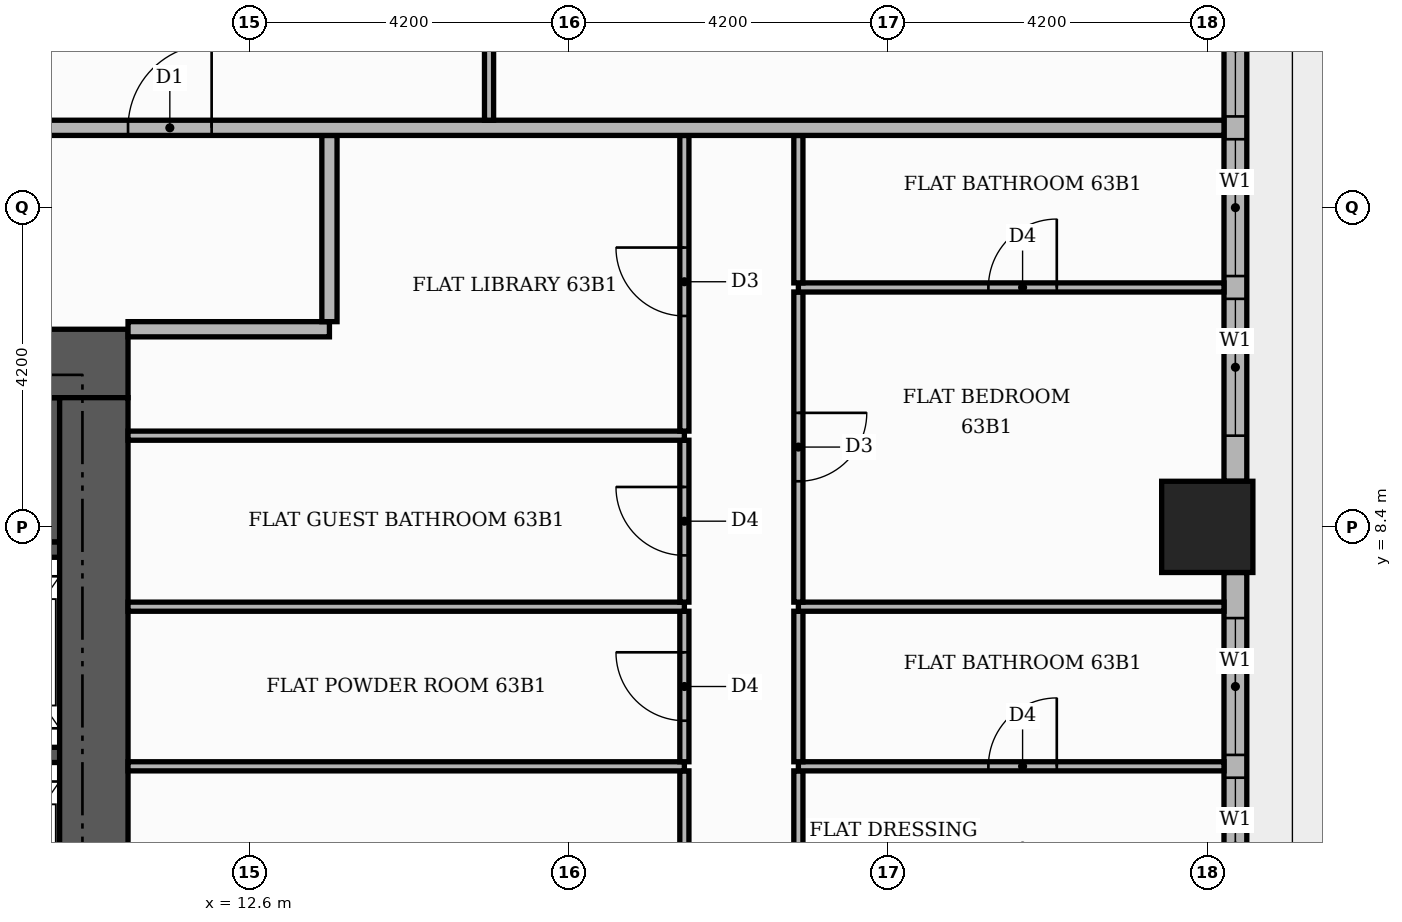
"""IFC4 building model, lengths in metres.
Left out: names, types, materials, properties, quantities, classifications, styles, units other than length and angle.
Written with IfcOpenShell. Run it as: python <this file> out.ifc"""

import sys

from ifc_helpers import new_model, si_unit, direction, frame, frame_2d, origin, origin_2d, place, context, subcontext, project, spatial, rectangle, extrude, element, fill, save


model = new_model("IFC4")
c1 = context("Model", 3, precision=1e-05, world=origin(), true_north=direction((0.0, 1.0)))
c2 = subcontext(c1, "Body", "Model", "MODEL_VIEW")
j1 = project(units=[si_unit("LENGTHUNIT", "METRE"), si_unit("PLANEANGLEUNIT", "RADIAN")], contexts=[c1])
p1 = place(None, origin())
s1 = spatial("IfcSite", under=j1, at=p1, CompositionType="ELEMENT")
p2 = place(p1, origin())
s2 = spatial("IfcBuilding", under=s1, at=p2, CompositionType="ELEMENT")
p3 = place(p2, frame((0.0, 0.0, 264.0)))
s3 = spatial("IfcBuildingStorey", under=s2, at=p3, CompositionType="ELEMENT", Elevation=264.0)
p4 = place(p3, frame((5.5, 9.15, 0.0), z_axis=(0.0, 0.0, 1.0), x_axis=(1.0, 0.0, 0.0)))
e1 = element("IfcWall", 1, at=p4, inside=s3, PredefinedType="SHEAR", context=c2, shape_type="SweptSolid", body=[
    extrude(rectangle(XDim=4.6, YDim=1.9, at=frame_2d((2.3, 0.0))), origin(), (0.0, 0.0, 1.0), 3.48),
])
for number, where, z_axis, x_axis in (
    (2, (8.1, 5.4, 0.0), (0.0, 0.0, 1.0), (1.0, 0.0, 0.0)),
    (3, (8.1, 8.1, 0.0), (0.0, 0.0, 1.0), (1.0, 0.0, 0.0)),
):
    element("IfcWall", number, at=place(p3, frame(where, z_axis=z_axis, x_axis=x_axis)), inside=s3, PredefinedType="SHEAR", context=c2, shape_type="SweptSolid", body=[
        extrude(rectangle(XDim=2.0, YDim=0.2, at=frame_2d((1.0, 0.0))), origin(), (0.0, 0.0, 1.0), 3.48),
    ])
p5 = place(p3, frame((-11.0, 10.55, 0.0), z_axis=(0.0, 0.0, 1.0), x_axis=(1.0, 0.0, 0.0)))
e4 = element("IfcWall", 4, at=p5, inside=s3, PredefinedType="SHEAR", context=c2, shape_type="SweptSolid", body=[
    extrude(rectangle(XDim=22.0, YDim=0.9, at=frame_2d((11.0, 0.0))), origin(), (0.0, 0.0, 1.0), 3.48),
])
p6 = place(p5, frame((13.3, 0.0, 0.0)))
e5 = element("IfcOpeningElement", 5, at=p6, cuts=e4, PredefinedType="OPENING", context=c2, shape_type="SweptSolid", body=[
    extrude(rectangle(XDim=1.8, YDim=2.2, at=frame_2d((0.9, 1.1))), frame((0.0, 0.46, 0.0), z_axis=(0.0, -1.0, 0.0), x_axis=(1.0, 0.0, 0.0)), (0.0, 0.0, 1.0), 0.92),
])
p7 = place(p3, frame((10.55, -10.1, 0.0), z_axis=(0.0, 0.0, 1.0), x_axis=(0.0, 1.0, 0.0)))
e6 = element("IfcWall", 6, at=p7, inside=s3, PredefinedType="SHEAR", context=c2, shape_type="SweptSolid", body=[
    extrude(rectangle(XDim=20.2, YDim=0.9, at=frame_2d((10.1, 0.0))), origin(), (0.0, 0.0, 1.0), 3.48),
])
p8 = place(p3, frame((25.2, 8.4, 0.0), z_axis=(0.0, 0.0, 1.0), x_axis=(1.0, 0.0, 0.0)))
e7 = element("IfcColumn", 7, at=p8, inside=s3, PredefinedType="COLUMN", context=c2, shape_type="SweptSolid", body=[
    extrude(rectangle(XDim=1.2, YDim=1.2, at=origin_2d()), origin(), (0.0, 0.0, 1.0), 3.9),
])
p9 = place(p3, frame((25.57, 0.6, 0.0), z_axis=(0.0, 0.0, 1.0), x_axis=(0.0, 1.0, 0.0)))
e8 = element("IfcWall", 8, at=p9, inside=s3, PredefinedType="STANDARD", context=c2, shape_type="SweptSolid", body=[
    extrude(rectangle(XDim=7.2, YDim=0.3, at=frame_2d((3.6, 0.0))), origin(), (0.0, 0.0, 1.0), 3.48),
])
p10 = place(p9, frame((0.6, 0.0, 0.0)))
e9 = element("IfcOpeningElement", 9, at=p10, cuts=e8, PredefinedType="OPENING", context=c2, shape_type="SweptSolid", body=[
    extrude(rectangle(XDim=1.8, YDim=2.4, at=frame_2d((0.9, 1.2))), frame((0.0, 0.16, 0.0), z_axis=(0.0, -1.0, 0.0), x_axis=(1.0, 0.0, 0.0)), (0.0, 0.0, 1.0), 0.32),
])
p11 = place(p9, frame((2.7, 0.0, 0.9)))
e10 = element("IfcOpeningElement", 10, at=p11, cuts=e8, PredefinedType="OPENING", context=c2, shape_type="SweptSolid", body=[
    extrude(rectangle(XDim=1.8, YDim=2.1, at=frame_2d((0.9, 1.05))), frame((0.0, 0.16, 0.0), z_axis=(0.0, -1.0, 0.0), x_axis=(1.0, 0.0, 0.0)), (0.0, 0.0, 1.0), 0.32),
])
p12 = place(p9, frame((4.8, 0.0, 0.9)))
e11 = element("IfcOpeningElement", 11, at=p12, cuts=e8, PredefinedType="OPENING", context=c2, shape_type="SweptSolid", body=[
    extrude(rectangle(XDim=1.8, YDim=2.1, at=frame_2d((0.9, 1.05))), frame((0.0, 0.16, 0.0), z_axis=(0.0, -1.0, 0.0), x_axis=(1.0, 0.0, 0.0)), (0.0, 0.0, 1.0), 0.32),
])
p13 = place(p3, frame((25.57, 9.0, 0.0), z_axis=(0.0, 0.0, 1.0), x_axis=(0.0, 1.0, 0.0)))
e12 = element("IfcWall", 12, at=p13, inside=s3, PredefinedType="STANDARD", context=c2, shape_type="SweptSolid", body=[
    extrude(rectangle(XDim=7.2, YDim=0.3, at=frame_2d((3.6, 0.0))), origin(), (0.0, 0.0, 1.0), 3.48),
])
p14 = place(p13, frame((0.6, 0.0, 0.9)))
e13 = element("IfcOpeningElement", 13, at=p14, cuts=e12, PredefinedType="OPENING", context=c2, shape_type="SweptSolid", body=[
    extrude(rectangle(XDim=1.8, YDim=2.1, at=frame_2d((0.9, 1.05))), frame((0.0, 0.16, 0.0), z_axis=(0.0, -1.0, 0.0), x_axis=(1.0, 0.0, 0.0)), (0.0, 0.0, 1.0), 0.32),
])
p15 = place(p13, frame((2.7, 0.0, 0.9)))
e14 = element("IfcOpeningElement", 14, at=p15, cuts=e12, PredefinedType="OPENING", context=c2, shape_type="SweptSolid", body=[
    extrude(rectangle(XDim=1.8, YDim=2.1, at=frame_2d((0.9, 1.05))), frame((0.0, 0.16, 0.0), z_axis=(0.0, -1.0, 0.0), x_axis=(1.0, 0.0, 0.0)), (0.0, 0.0, 1.0), 0.32),
])
p16 = place(p13, frame((4.8, 0.0, 0.9)))
e15 = element("IfcOpeningElement", 15, at=p16, cuts=e12, PredefinedType="OPENING", context=c2, shape_type="SweptSolid", body=[
    extrude(rectangle(XDim=1.8, YDim=2.1, at=frame_2d((0.9, 1.05))), frame((0.0, 0.16, 0.0), z_axis=(0.0, -1.0, 0.0), x_axis=(1.0, 0.0, 0.0)), (0.0, 0.0, 1.0), 0.32),
])
p17 = place(p3, frame((18.32, 1.11, 0.0), z_axis=(0.0, 0.0, 1.0), x_axis=(0.0, 1.0, 0.0)))
e16 = element("IfcWall", 16, at=p17, inside=s3, PredefinedType="PARTITIONING", context=c2, shape_type="SweptSolid", body=[
    extrude(rectangle(XDim=4.08, YDim=0.12, at=frame_2d((2.04, 0.0))), origin(), (0.0, 0.0, 1.0), 3.48),
])
p18 = place(p17, frame((1.59, 0.0, 0.0)))
e17 = element("IfcOpeningElement", 17, at=p18, cuts=e16, PredefinedType="OPENING", context=c2, shape_type="SweptSolid", body=[
    extrude(rectangle(XDim=0.9, YDim=2.1, at=frame_2d((0.45, 1.05))), frame((0.0, 0.07, 0.0), z_axis=(0.0, -1.0, 0.0), x_axis=(1.0, 0.0, 0.0)), (0.0, 0.0, 1.0), 0.14),
])
p19 = place(p3, frame((19.82, 3.21, 0.0), z_axis=(0.0, 0.0, 1.0), x_axis=(0.0, 1.0, 0.0)))
e18 = element("IfcWall", 18, at=p19, inside=s3, PredefinedType="PARTITIONING", context=c2, shape_type="SweptSolid", body=[
    extrude(rectangle(XDim=1.98, YDim=0.12, at=frame_2d((0.99, 0.0))), origin(), (0.0, 0.0, 1.0), 3.48),
])
p20 = place(p3, frame((11.0, 5.25, 0.0), z_axis=(0.0, 0.0, 1.0), x_axis=(1.0, 0.0, 0.0)))
e19 = element("IfcWall", 19, at=p20, inside=s3, PredefinedType="PARTITIONING", context=c2, shape_type="SweptSolid", body=[
    extrude(rectangle(XDim=7.32, YDim=0.12, at=frame_2d((3.66, 0.0))), origin(), (0.0, 0.0, 1.0), 3.48),
])
p21 = place(p3, frame((19.82, 5.25, 0.0), z_axis=(0.0, 0.0, 1.0), x_axis=(1.0, 0.0, 0.0)))
e20 = element("IfcWall", 20, at=p21, inside=s3, PredefinedType="PARTITIONING", context=c2, shape_type="SweptSolid", body=[
    extrude(rectangle(XDim=5.6, YDim=0.12, at=frame_2d((2.8, 0.0))), origin(), (0.0, 0.0, 1.0), 3.48),
])
p22 = place(p21, frame((2.5, 0.0, 0.0)))
e21 = element("IfcOpeningElement", 21, at=p22, cuts=e20, PredefinedType="OPENING", context=c2, shape_type="SweptSolid", body=[
    extrude(rectangle(XDim=0.9, YDim=2.1, at=frame_2d((0.45, 1.05))), frame((0.0, 0.07, 0.0), z_axis=(0.0, -1.0, 0.0), x_axis=(1.0, 0.0, 0.0)), (0.0, 0.0, 1.0), 0.14),
])
p23 = place(p3, frame((18.32, 5.31, 0.0), z_axis=(0.0, 0.0, 1.0), x_axis=(0.0, 1.0, 0.0)))
e22 = element("IfcWall", 22, at=p23, inside=s3, PredefinedType="PARTITIONING", context=c2, shape_type="SweptSolid", body=[
    extrude(rectangle(XDim=1.98, YDim=0.12, at=frame_2d((0.99, 0.0))), origin(), (0.0, 0.0, 1.0), 3.48),
])
p24 = place(p23, frame((0.54, 0.0, 0.0)))
e23 = element("IfcOpeningElement", 23, at=p24, cuts=e22, PredefinedType="OPENING", context=c2, shape_type="SweptSolid", body=[
    extrude(rectangle(XDim=0.9, YDim=2.1, at=frame_2d((0.45, 1.05))), frame((0.0, 0.07, 0.0), z_axis=(0.0, -1.0, 0.0), x_axis=(1.0, 0.0, 0.0)), (0.0, 0.0, 1.0), 0.14),
])
p25 = place(p3, frame((19.82, 5.31, 0.0), z_axis=(0.0, 0.0, 1.0), x_axis=(0.0, 1.0, 0.0)))
e24 = element("IfcWall", 24, at=p25, inside=s3, PredefinedType="PARTITIONING", context=c2, shape_type="SweptSolid", body=[
    extrude(rectangle(XDim=1.98, YDim=0.12, at=frame_2d((0.99, 0.0))), origin(), (0.0, 0.0, 1.0), 3.48),
])
p26 = place(p3, frame((11.0, 7.35, 0.0), z_axis=(0.0, 0.0, 1.0), x_axis=(1.0, 0.0, 0.0)))
e25 = element("IfcWall", 25, at=p26, inside=s3, PredefinedType="PARTITIONING", context=c2, shape_type="SweptSolid", body=[
    extrude(rectangle(XDim=7.32, YDim=0.12, at=frame_2d((3.66, 0.0))), origin(), (0.0, 0.0, 1.0), 3.48),
])
p27 = place(p3, frame((19.82, 7.35, 0.0), z_axis=(0.0, 0.0, 1.0), x_axis=(1.0, 0.0, 0.0)))
e26 = element("IfcWall", 26, at=p27, inside=s3, PredefinedType="PARTITIONING", context=c2, shape_type="SweptSolid", body=[
    extrude(rectangle(XDim=5.6, YDim=0.12, at=frame_2d((2.8, 0.0))), origin(), (0.0, 0.0, 1.0), 3.48),
])
p28 = place(p3, frame((18.32, 7.41, 0.0), z_axis=(0.0, 0.0, 1.0), x_axis=(0.0, 1.0, 0.0)))
e27 = element("IfcWall", 27, at=p28, inside=s3, PredefinedType="PARTITIONING", context=c2, shape_type="SweptSolid", body=[
    extrude(rectangle(XDim=2.13, YDim=0.12, at=frame_2d((1.065, 0.0))), origin(), (0.0, 0.0, 1.0), 3.48),
])
p29 = place(p28, frame((0.615, 0.0, 0.0)))
e28 = element("IfcOpeningElement", 28, at=p29, cuts=e27, PredefinedType="OPENING", context=c2, shape_type="SweptSolid", body=[
    extrude(rectangle(XDim=0.9, YDim=2.1, at=frame_2d((0.45, 1.05))), frame((0.0, 0.07, 0.0), z_axis=(0.0, -1.0, 0.0), x_axis=(1.0, 0.0, 0.0)), (0.0, 0.0, 1.0), 0.14),
])
p30 = place(p3, frame((19.82, 7.41, 0.0), z_axis=(0.0, 0.0, 1.0), x_axis=(0.0, 1.0, 0.0)))
e29 = element("IfcWall", 29, at=p30, inside=s3, PredefinedType="PARTITIONING", context=c2, shape_type="SweptSolid", body=[
    extrude(rectangle(XDim=4.08, YDim=0.12, at=frame_2d((2.04, 0.0))), origin(), (0.0, 0.0, 1.0), 3.48),
])
p31 = place(p30, frame((1.59, 0.0, 0.0)))
e30 = element("IfcOpeningElement", 30, at=p31, cuts=e29, PredefinedType="OPENING", context=c2, shape_type="SweptSolid", body=[
    extrude(rectangle(XDim=0.9, YDim=2.1, at=frame_2d((0.45, 1.05))), frame((0.0, 0.07, 0.0), z_axis=(0.0, -1.0, 0.0), x_axis=(1.0, 0.0, 0.0)), (0.0, 0.0, 1.0), 0.14),
])
p32 = place(p3, frame((11.0, 9.6, 0.0), z_axis=(0.0, 0.0, 1.0), x_axis=(1.0, 0.0, 0.0)))
e31 = element("IfcWall", 31, at=p32, inside=s3, PredefinedType="PARTITIONING", context=c2, shape_type="SweptSolid", body=[
    extrude(rectangle(XDim=7.32, YDim=0.12, at=frame_2d((3.66, 0.0))), origin(), (0.0, 0.0, 1.0), 3.48),
])
p33 = place(p3, frame((18.32, 9.66, 0.0), z_axis=(0.0, 0.0, 1.0), x_axis=(0.0, 1.0, 0.0)))
e32 = element("IfcWall", 32, at=p33, inside=s3, PredefinedType="PARTITIONING", context=c2, shape_type="SweptSolid", body=[
    extrude(rectangle(XDim=3.89, YDim=0.12, at=frame_2d((1.945, 0.0))), origin(), (0.0, 0.0, 1.0), 3.48),
])
p34 = place(p33, frame((1.515, 0.0, 0.0)))
e33 = element("IfcOpeningElement", 33, at=p34, cuts=e32, PredefinedType="OPENING", context=c2, shape_type="SweptSolid", body=[
    extrude(rectangle(XDim=0.9, YDim=2.1, at=frame_2d((0.45, 1.05))), frame((0.0, 0.07, 0.0), z_axis=(0.0, -1.0, 0.0), x_axis=(1.0, 0.0, 0.0)), (0.0, 0.0, 1.0), 0.14),
])
p35 = place(p3, frame((11.0, 11.0, 0.0), z_axis=(0.0, 0.0, 1.0), x_axis=(1.0, 0.0, 0.0)))
e34 = element("IfcWall", 34, at=p35, inside=s3, PredefinedType="PARTITIONING", context=c2, shape_type="SweptSolid", body=[
    extrude(rectangle(XDim=2.65, YDim=0.2, at=frame_2d((1.325, 0.0))), origin(), (0.0, 0.0, 1.0), 3.48),
])
p36 = place(p3, frame((13.65, 11.1, 0.0), z_axis=(0.0, 0.0, 1.0), x_axis=(0.0, 1.0, 0.0)))
e35 = element("IfcWall", 35, at=p36, inside=s3, PredefinedType="PARTITIONING", context=c2, shape_type="SweptSolid", body=[
    extrude(rectangle(XDim=2.45, YDim=0.2, at=frame_2d((1.225, 0.0))), origin(), (0.0, 0.0, 1.0), 3.48),
])
p37 = place(p3, frame((19.82, 11.55, 0.0), z_axis=(0.0, 0.0, 1.0), x_axis=(1.0, 0.0, 0.0)))
e36 = element("IfcWall", 36, at=p37, inside=s3, PredefinedType="PARTITIONING", context=c2, shape_type="SweptSolid", body=[
    extrude(rectangle(XDim=5.6, YDim=0.12, at=frame_2d((2.8, 0.0))), origin(), (0.0, 0.0, 1.0), 3.48),
])
p38 = place(p37, frame((2.5, 0.0, 0.0)))
e37 = element("IfcOpeningElement", 37, at=p38, cuts=e36, PredefinedType="OPENING", context=c2, shape_type="SweptSolid", body=[
    extrude(rectangle(XDim=0.9, YDim=2.1, at=frame_2d((0.45, 1.05))), frame((0.0, 0.07, 0.0), z_axis=(0.0, -1.0, 0.0), x_axis=(1.0, 0.0, 0.0)), (0.0, 0.0, 1.0), 0.14),
])
p39 = place(p3, frame((19.82, 11.61, 0.0), z_axis=(0.0, 0.0, 1.0), x_axis=(0.0, 1.0, 0.0)))
e38 = element("IfcWall", 38, at=p39, inside=s3, PredefinedType="PARTITIONING", context=c2, shape_type="SweptSolid", body=[
    extrude(rectangle(XDim=1.94, YDim=0.12, at=frame_2d((0.97, 0.0))), origin(), (0.0, 0.0, 1.0), 3.48),
])
p40 = place(p3, frame((-13.65, 13.65, 0.0), z_axis=(0.0, 0.0, 1.0), x_axis=(1.0, 0.0, 0.0)))
e39 = element("IfcWall", 39, at=p40, inside=s3, PredefinedType="PARTITIONING", context=c2, shape_type="SweptSolid", body=[
    extrude(rectangle(XDim=39.07, YDim=0.2, at=frame_2d((19.535, 0.0))), origin(), (0.0, 0.0, 1.0), 3.48),
])
p41 = place(p40, frame((24.65, 0.0, 0.0)))
e40 = element("IfcOpeningElement", 40, at=p41, cuts=e39, PredefinedType="OPENING", context=c2, shape_type="SweptSolid", body=[
    extrude(rectangle(XDim=1.1, YDim=2.4, at=frame_2d((0.55, 1.2))), frame((0.0, 0.11, 0.0), z_axis=(0.0, -1.0, 0.0), x_axis=(1.0, 0.0, 0.0)), (0.0, 0.0, 1.0), 0.22),
])
p42 = place(p3, frame((15.75, 13.75, 0.0), z_axis=(0.0, 0.0, 1.0), x_axis=(0.0, 1.0, 0.0)))
e41 = element("IfcWall", 41, at=p42, inside=s3, PredefinedType="PARTITIONING", context=c2, shape_type="SweptSolid", body=[
    extrude(rectangle(XDim=6.31, YDim=0.12, at=frame_2d((3.155, 0.0))), origin(), (0.0, 0.0, 1.0), 3.48),
])
p43 = place(p42, frame((2.685, 0.0, 0.0)))
e42 = element("IfcOpeningElement", 42, at=p43, cuts=e41, PredefinedType="OPENING", context=c2, shape_type="SweptSolid", body=[
    extrude(rectangle(XDim=0.9, YDim=2.1, at=frame_2d((0.45, 1.05))), frame((0.0, 0.07, 0.0), z_axis=(0.0, -1.0, 0.0), x_axis=(1.0, 0.0, 0.0)), (0.0, 0.0, 1.0), 0.14),
])
p44 = place(p11, origin())
e43 = element("IfcWindow", 43, at=p44, inside=s3, PartitioningType="SINGLE_PANEL", PredefinedType="WINDOW", context=c2, shape_type="SweptSolid", body=[
    extrude(rectangle(XDim=1.8, YDim=2.1, at=frame_2d((0.9, 1.05))), frame((0.0, 0.03, 0.0), z_axis=(0.0, -1.0, 0.0), x_axis=(1.0, 0.0, 0.0)), (0.0, 0.0, 1.0), 0.06),
])
fill(e10, e43)
p45 = place(p12, origin())
e44 = element("IfcWindow", 44, at=p45, inside=s3, PartitioningType="SINGLE_PANEL", PredefinedType="WINDOW", context=c2, shape_type="SweptSolid", body=[
    extrude(rectangle(XDim=1.8, YDim=2.1, at=frame_2d((0.9, 1.05))), frame((0.0, 0.03, 0.0), z_axis=(0.0, -1.0, 0.0), x_axis=(1.0, 0.0, 0.0)), (0.0, 0.0, 1.0), 0.06),
])
fill(e11, e44)
p46 = place(p14, origin())
e45 = element("IfcWindow", 45, at=p46, inside=s3, PartitioningType="SINGLE_PANEL", PredefinedType="WINDOW", context=c2, shape_type="SweptSolid", body=[
    extrude(rectangle(XDim=1.8, YDim=2.1, at=frame_2d((0.9, 1.05))), frame((0.0, 0.03, 0.0), z_axis=(0.0, -1.0, 0.0), x_axis=(1.0, 0.0, 0.0)), (0.0, 0.0, 1.0), 0.06),
])
fill(e13, e45)
p47 = place(p15, origin())
e46 = element("IfcWindow", 46, at=p47, inside=s3, PartitioningType="SINGLE_PANEL", PredefinedType="WINDOW", context=c2, shape_type="SweptSolid", body=[
    extrude(rectangle(XDim=1.8, YDim=2.1, at=frame_2d((0.9, 1.05))), frame((0.0, 0.03, 0.0), z_axis=(0.0, -1.0, 0.0), x_axis=(1.0, 0.0, 0.0)), (0.0, 0.0, 1.0), 0.06),
])
fill(e14, e46)
p48 = place(p16, origin())
e47 = element("IfcWindow", 47, at=p48, inside=s3, PartitioningType="SINGLE_PANEL", PredefinedType="WINDOW", context=c2, shape_type="SweptSolid", body=[
    extrude(rectangle(XDim=1.8, YDim=2.1, at=frame_2d((0.9, 1.05))), frame((0.0, 0.03, 0.0), z_axis=(0.0, -1.0, 0.0), x_axis=(1.0, 0.0, 0.0)), (0.0, 0.0, 1.0), 0.06),
])
fill(e15, e47)
p49 = place(p24, origin())
e48 = element("IfcDoor", 48, at=p49, inside=s3, OperationType="SINGLE_SWING_RIGHT", PredefinedType="DOOR", context=c2, shape_type="SweptSolid", body=[
    extrude(rectangle(XDim=0.9, YDim=2.1, at=frame_2d((0.45, 1.05))), frame((0.0, 0.025, 0.0), z_axis=(0.0, -1.0, 0.0), x_axis=(1.0, 0.0, 0.0)), (0.0, 0.0, 1.0), 0.05),
])
fill(e23, e48)
p50 = place(p29, origin())
e49 = element("IfcDoor", 49, at=p50, inside=s3, OperationType="SINGLE_SWING_RIGHT", PredefinedType="DOOR", context=c2, shape_type="SweptSolid", body=[
    extrude(rectangle(XDim=0.9, YDim=2.1, at=frame_2d((0.45, 1.05))), frame((0.0, 0.025, 0.0), z_axis=(0.0, -1.0, 0.0), x_axis=(1.0, 0.0, 0.0)), (0.0, 0.0, 1.0), 0.05),
])
fill(e28, e49)
p51 = place(p34, origin())
e50 = element("IfcDoor", 50, at=p51, inside=s3, OperationType="SINGLE_SWING_RIGHT", PredefinedType="DOOR", context=c2, shape_type="SweptSolid", body=[
    extrude(rectangle(XDim=0.9, YDim=2.1, at=frame_2d((0.45, 1.05))), frame((0.0, 0.025, 0.0), z_axis=(0.0, -1.0, 0.0), x_axis=(1.0, 0.0, 0.0)), (0.0, 0.0, 1.0), 0.05),
])
fill(e33, e50)
p52 = place(p22, origin())
e51 = element("IfcDoor", 51, at=p52, inside=s3, OperationType="SINGLE_SWING_RIGHT", PredefinedType="DOOR", context=c2, shape_type="SweptSolid", body=[
    extrude(rectangle(XDim=0.9, YDim=2.1, at=frame_2d((0.45, 1.05))), frame((0.0, 0.025, 0.0), z_axis=(0.0, -1.0, 0.0), x_axis=(1.0, 0.0, 0.0)), (0.0, 0.0, 1.0), 0.05),
])
fill(e21, e51)
p53 = place(p31, frame((0.9, 0.0, 0.0), z_axis=(0.0, 0.0, 1.0), x_axis=(-1.0, 0.0, 0.0)))
e52 = element("IfcDoor", 52, at=p53, inside=s3, OperationType="SINGLE_SWING_RIGHT", PredefinedType="DOOR", context=c2, shape_type="SweptSolid", body=[
    extrude(rectangle(XDim=0.9, YDim=2.1, at=frame_2d((0.45, 1.05))), frame((0.0, 0.025, 0.0), z_axis=(0.0, -1.0, 0.0), x_axis=(1.0, 0.0, 0.0)), (0.0, 0.0, 1.0), 0.05),
])
fill(e30, e52)
p54 = place(p38, origin())
e53 = element("IfcDoor", 53, at=p54, inside=s3, OperationType="SINGLE_SWING_RIGHT", PredefinedType="DOOR", context=c2, shape_type="SweptSolid", body=[
    extrude(rectangle(XDim=0.9, YDim=2.1, at=frame_2d((0.45, 1.05))), frame((0.0, 0.025, 0.0), z_axis=(0.0, -1.0, 0.0), x_axis=(1.0, 0.0, 0.0)), (0.0, 0.0, 1.0), 0.05),
])
fill(e37, e53)
p55 = place(p41, origin())
e54 = element("IfcDoor", 54, at=p55, inside=s3, OperationType="SINGLE_SWING_RIGHT", PredefinedType="DOOR", context=c2, shape_type="SweptSolid", body=[
    extrude(rectangle(XDim=1.1, YDim=2.4, at=frame_2d((0.55, 1.2))), frame((0.0, 0.025, 0.0), z_axis=(0.0, -1.0, 0.0), x_axis=(1.0, 0.0, 0.0)), (0.0, 0.0, 1.0), 0.05),
])
fill(e40, e54)
save(model, sys.argv[1])
